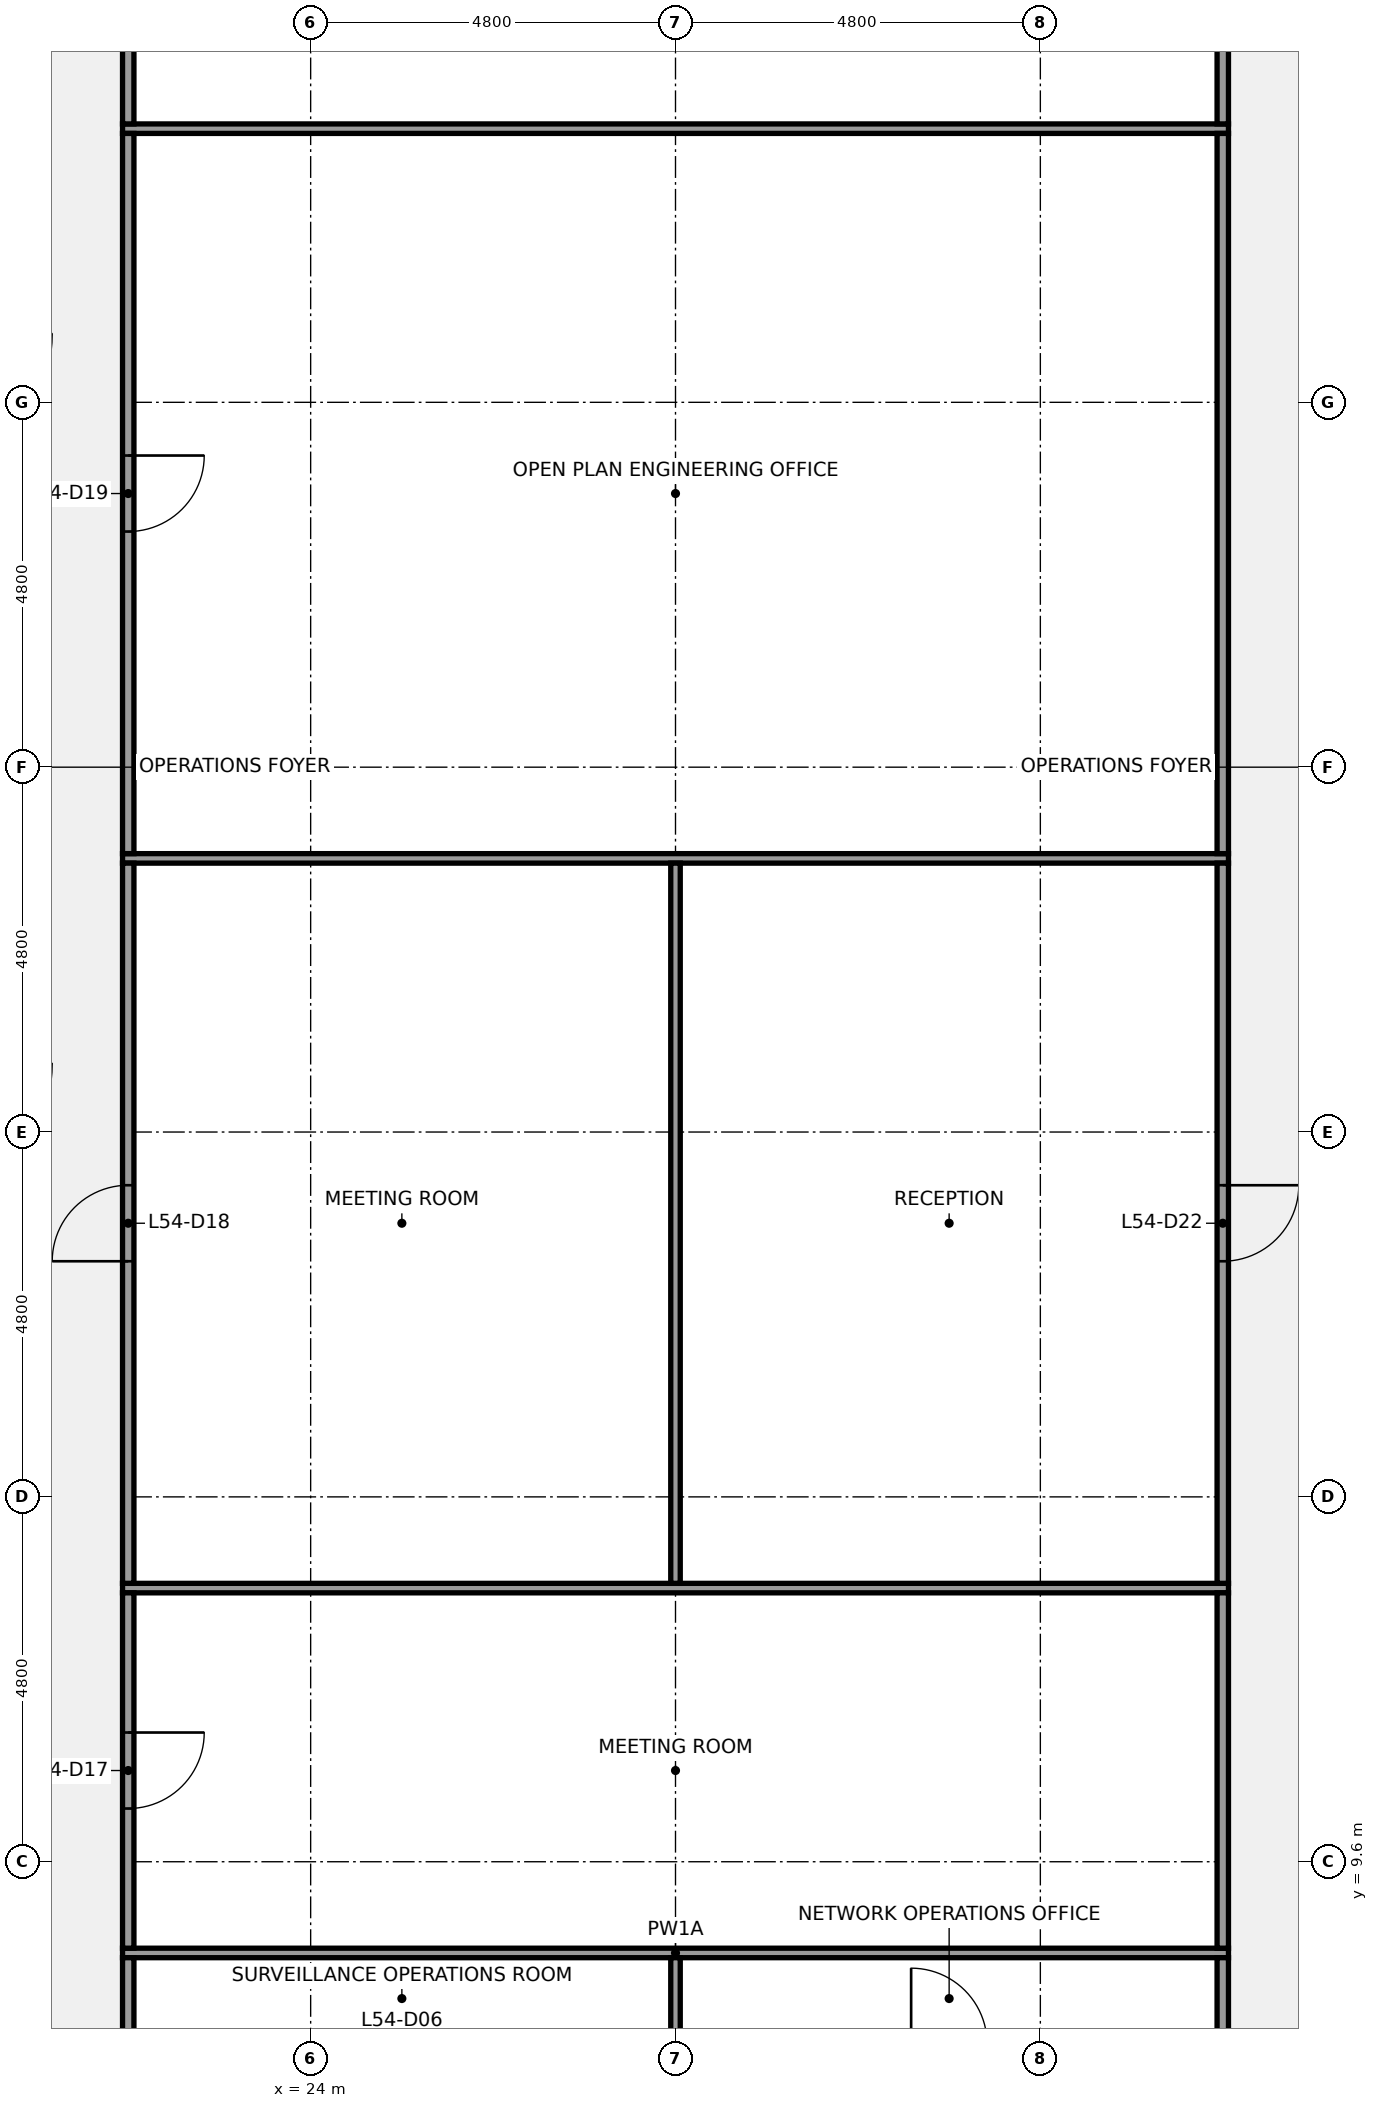
"""IFC4 building model, lengths in metres.
Left out: names, types, materials, properties, quantities, classifications, styles, units other than length and angle.
Written with IfcOpenShell. Run it as: python <this file> out.ifc"""

import sys

from ifc_helpers import new_model, si_unit, direction, frame, frame_2d, origin, place, context, subcontext, project, spatial, rectangle, extrude, element, fill, save


model = new_model("IFC4")
c1 = context("Model", 3, precision=1e-05, world=origin(), true_north=direction((0.0, 1.0)))
c2 = subcontext(c1, "Body", "Model", "MODEL_VIEW")
j1 = project(units=[si_unit("LENGTHUNIT", "METRE"), si_unit("PLANEANGLEUNIT", "RADIAN")], contexts=[c1])
p1 = place(None, origin())
s1 = spatial("IfcSite", under=j1, at=p1, CompositionType="ELEMENT")
p2 = place(p1, origin())
s2 = spatial("IfcBuilding", under=s1, at=p2, CompositionType="ELEMENT")
p3 = place(p2, frame((0.0, 0.0, 245.2)))
s3 = spatial("IfcBuildingStorey", under=s2, at=p3, CompositionType="ELEMENT", Elevation=245.2)
for number, where, z_axis, x_axis in (
    (1, (21.525, 8.4, 0.0), (0.0, 0.0, 1.0), (1.0, 0.0, 0.0)),
    (2, (21.525, 13.2, 0.0), (0.0, 0.0, 1.0), (1.0, 0.0, 0.0)),
    (3, (21.525, 22.8, 0.0), (0.0, 0.0, 1.0), (1.0, 0.0, 0.0)),
    (4, (21.525, 32.4, 0.0), (0.0, 0.0, 1.0), (1.0, 0.0, 0.0)),
):
    element("IfcWall", number, at=place(p3, frame(where, z_axis=z_axis, x_axis=x_axis)), inside=s3, PredefinedType="PARTITIONING", context=c2, shape_type="SweptSolid", body=[
        extrude(rectangle(XDim=14.55, YDim=0.125, at=frame_2d((7.275, 0.0))), origin(), (0.0, 0.0, 1.0), 2.87),
    ])
p4 = place(p3, frame((21.6, 7.275, 0.0), z_axis=(0.0, 0.0, 1.0), x_axis=(0.0, 1.0, 0.0)))
e5 = element("IfcWall", 5, at=p4, inside=s3, PredefinedType="PARTITIONING", context=c2, shape_type="SweptSolid", body=[
    extrude(rectangle(XDim=1.062, YDim=0.15, at=frame_2d((0.531, 0.0))), origin(), (0.0, 0.0, 1.0), 2.87),
])
p5 = place(p3, frame((21.6, 8.462, 0.0), z_axis=(0.0, 0.0, 1.0), x_axis=(0.0, 1.0, 0.0)))
e6 = element("IfcWall", 6, at=p5, inside=s3, PredefinedType="PARTITIONING", context=c2, shape_type="SweptSolid", body=[
    extrude(rectangle(XDim=4.675, YDim=0.15, at=frame_2d((2.337, 0.0))), origin(), (0.0, 0.0, 1.0), 2.87),
])
p6 = place(p5, frame((1.837, 0.0, 0.0)))
e7 = element("IfcOpeningElement", 7, at=p6, cuts=e6, PredefinedType="OPENING", context=c2, shape_type="SweptSolid", body=[
    extrude(rectangle(XDim=1.0, YDim=2.1, at=frame_2d((0.5, 1.05))), frame((0.0, 0.085, 0.0), z_axis=(0.0, -1.0, 0.0), x_axis=(1.0, 0.0, 0.0)), (0.0, 0.0, 1.0), 0.17),
])
p7 = place(p3, frame((21.6, 13.262, 0.0), z_axis=(0.0, 0.0, 1.0), x_axis=(0.0, 1.0, 0.0)))
e8 = element("IfcWall", 8, at=p7, inside=s3, PredefinedType="PARTITIONING", context=c2, shape_type="SweptSolid", body=[
    extrude(rectangle(XDim=9.475, YDim=0.15, at=frame_2d((4.738, 0.0))), origin(), (0.0, 0.0, 1.0), 2.87),
])
p8 = place(p7, frame((4.238, 0.0, 0.0)))
e9 = element("IfcOpeningElement", 9, at=p8, cuts=e8, PredefinedType="OPENING", context=c2, shape_type="SweptSolid", body=[
    extrude(rectangle(XDim=1.0, YDim=2.1, at=frame_2d((0.5, 1.05))), frame((0.0, 0.085, 0.0), z_axis=(0.0, -1.0, 0.0), x_axis=(1.0, 0.0, 0.0)), (0.0, 0.0, 1.0), 0.17),
])
p9 = place(p3, frame((21.6, 22.863, 0.0), z_axis=(0.0, 0.0, 1.0), x_axis=(0.0, 1.0, 0.0)))
e10 = element("IfcWall", 10, at=p9, inside=s3, PredefinedType="PARTITIONING", context=c2, shape_type="SweptSolid", body=[
    extrude(rectangle(XDim=9.475, YDim=0.15, at=frame_2d((4.737, 0.0))), origin(), (0.0, 0.0, 1.0), 2.87),
])
p10 = place(p9, frame((4.238, 0.0, 0.0)))
e11 = element("IfcOpeningElement", 11, at=p10, cuts=e10, PredefinedType="OPENING", context=c2, shape_type="SweptSolid", body=[
    extrude(rectangle(XDim=1.0, YDim=2.1, at=frame_2d((0.5, 1.05))), frame((0.0, 0.085, 0.0), z_axis=(0.0, -1.0, 0.0), x_axis=(1.0, 0.0, 0.0)), (0.0, 0.0, 1.0), 0.17),
])
p11 = place(p3, frame((21.6, 32.462, 0.0), z_axis=(0.0, 0.0, 1.0), x_axis=(0.0, 1.0, 0.0)))
e12 = element("IfcWall", 12, at=p11, inside=s3, PredefinedType="PARTITIONING", context=c2, shape_type="SweptSolid", body=[
    extrude(rectangle(XDim=3.475, YDim=0.15, at=frame_2d((1.738, 0.0))), origin(), (0.0, 0.0, 1.0), 2.87),
])
p12 = place(p11, frame((1.238, 0.0, 0.0)))
e13 = element("IfcOpeningElement", 13, at=p12, cuts=e12, PredefinedType="OPENING", context=c2, shape_type="SweptSolid", body=[
    extrude(rectangle(XDim=1.0, YDim=2.1, at=frame_2d((0.5, 1.05))), frame((0.0, 0.085, 0.0), z_axis=(0.0, -1.0, 0.0), x_axis=(1.0, 0.0, 0.0)), (0.0, 0.0, 1.0), 0.17),
])
p13 = place(p3, frame((28.8, 7.275, 0.0), z_axis=(0.0, 0.0, 1.0), x_axis=(0.0, 1.0, 0.0)))
e14 = element("IfcWall", 14, at=p13, inside=s3, PredefinedType="PARTITIONING", context=c2, shape_type="SweptSolid", body=[
    extrude(rectangle(XDim=1.062, YDim=0.125, at=frame_2d((0.531, 0.0))), origin(), (0.0, 0.0, 1.0), 2.87),
])
p14 = place(p3, frame((28.8, 13.262, 0.0), z_axis=(0.0, 0.0, 1.0), x_axis=(0.0, 1.0, 0.0)))
e15 = element("IfcWall", 15, at=p14, inside=s3, PredefinedType="PARTITIONING", context=c2, shape_type="SweptSolid", body=[
    extrude(rectangle(XDim=9.475, YDim=0.125, at=frame_2d((4.738, 0.0))), origin(), (0.0, 0.0, 1.0), 2.87),
])
p15 = place(p3, frame((36.0, 7.275, 0.0), z_axis=(0.0, 0.0, 1.0), x_axis=(0.0, 1.0, 0.0)))
e16 = element("IfcWall", 16, at=p15, inside=s3, PredefinedType="PARTITIONING", context=c2, shape_type="SweptSolid", body=[
    extrude(rectangle(XDim=1.062, YDim=0.15, at=frame_2d((0.531, 0.0))), origin(), (0.0, 0.0, 1.0), 2.87),
])
p16 = place(p3, frame((36.0, 8.462, 0.0), z_axis=(0.0, 0.0, 1.0), x_axis=(0.0, 1.0, 0.0)))
e17 = element("IfcWall", 17, at=p16, inside=s3, PredefinedType="PARTITIONING", context=c2, shape_type="SweptSolid", body=[
    extrude(rectangle(XDim=4.675, YDim=0.15, at=frame_2d((2.337, 0.0))), origin(), (0.0, 0.0, 1.0), 2.87),
])
p17 = place(p3, frame((36.0, 13.262, 0.0), z_axis=(0.0, 0.0, 1.0), x_axis=(0.0, 1.0, 0.0)))
e18 = element("IfcWall", 18, at=p17, inside=s3, PredefinedType="PARTITIONING", context=c2, shape_type="SweptSolid", body=[
    extrude(rectangle(XDim=9.475, YDim=0.15, at=frame_2d((4.738, 0.0))), origin(), (0.0, 0.0, 1.0), 2.87),
])
p18 = place(p17, frame((4.238, 0.0, 0.0)))
e19 = element("IfcOpeningElement", 19, at=p18, cuts=e18, PredefinedType="OPENING", context=c2, shape_type="SweptSolid", body=[
    extrude(rectangle(XDim=1.0, YDim=2.1, at=frame_2d((0.5, 1.05))), frame((0.0, 0.085, 0.0), z_axis=(0.0, -1.0, 0.0), x_axis=(1.0, 0.0, 0.0)), (0.0, 0.0, 1.0), 0.17),
])
p19 = place(p3, frame((36.0, 22.863, 0.0), z_axis=(0.0, 0.0, 1.0), x_axis=(0.0, 1.0, 0.0)))
e20 = element("IfcWall", 20, at=p19, inside=s3, PredefinedType="PARTITIONING", context=c2, shape_type="SweptSolid", body=[
    extrude(rectangle(XDim=9.475, YDim=0.15, at=frame_2d((4.737, 0.0))), origin(), (0.0, 0.0, 1.0), 2.87),
])
p20 = place(p3, frame((36.0, 32.462, 0.0), z_axis=(0.0, 0.0, 1.0), x_axis=(0.0, 1.0, 0.0)))
e21 = element("IfcWall", 21, at=p20, inside=s3, PredefinedType="PARTITIONING", context=c2, shape_type="SweptSolid", body=[
    extrude(rectangle(XDim=3.475, YDim=0.15, at=frame_2d((1.738, 0.0))), origin(), (0.0, 0.0, 1.0), 2.87),
])
p21 = place(p6, origin())
e22 = element("IfcDoor", 22, at=p21, inside=s3, OperationType="SINGLE_SWING_RIGHT", PredefinedType="DOOR", context=c2, shape_type="SweptSolid", body=[
    extrude(rectangle(XDim=1.0, YDim=2.1, at=frame_2d((0.5, 1.05))), frame((0.0, 0.025, 0.0), z_axis=(0.0, -1.0, 0.0), x_axis=(1.0, 0.0, 0.0)), (0.0, 0.0, 1.0), 0.05),
])
fill(e7, e22)
p22 = place(p8, origin())
e23 = element("IfcDoor", 23, at=p22, inside=s3, OperationType="SINGLE_SWING_LEFT", PredefinedType="DOOR", context=c2, shape_type="SweptSolid", body=[
    extrude(rectangle(XDim=1.0, YDim=2.1, at=frame_2d((0.5, 1.05))), frame((0.0, 0.025, 0.0), z_axis=(0.0, -1.0, 0.0), x_axis=(1.0, 0.0, 0.0)), (0.0, 0.0, 1.0), 0.05),
])
fill(e9, e23)
p23 = place(p10, origin())
e24 = element("IfcDoor", 24, at=p23, inside=s3, OperationType="SINGLE_SWING_RIGHT", PredefinedType="DOOR", context=c2, shape_type="SweptSolid", body=[
    extrude(rectangle(XDim=1.0, YDim=2.1, at=frame_2d((0.5, 1.05))), frame((0.0, 0.025, 0.0), z_axis=(0.0, -1.0, 0.0), x_axis=(1.0, 0.0, 0.0)), (0.0, 0.0, 1.0), 0.05),
])
fill(e11, e24)
p24 = place(p18, origin())
e25 = element("IfcDoor", 25, at=p24, inside=s3, OperationType="SINGLE_SWING_RIGHT", PredefinedType="DOOR", context=c2, shape_type="SweptSolid", body=[
    extrude(rectangle(XDim=1.0, YDim=2.1, at=frame_2d((0.5, 1.05))), frame((0.0, 0.025, 0.0), z_axis=(0.0, -1.0, 0.0), x_axis=(1.0, 0.0, 0.0)), (0.0, 0.0, 1.0), 0.05),
])
fill(e19, e25)
save(model, sys.argv[1])
